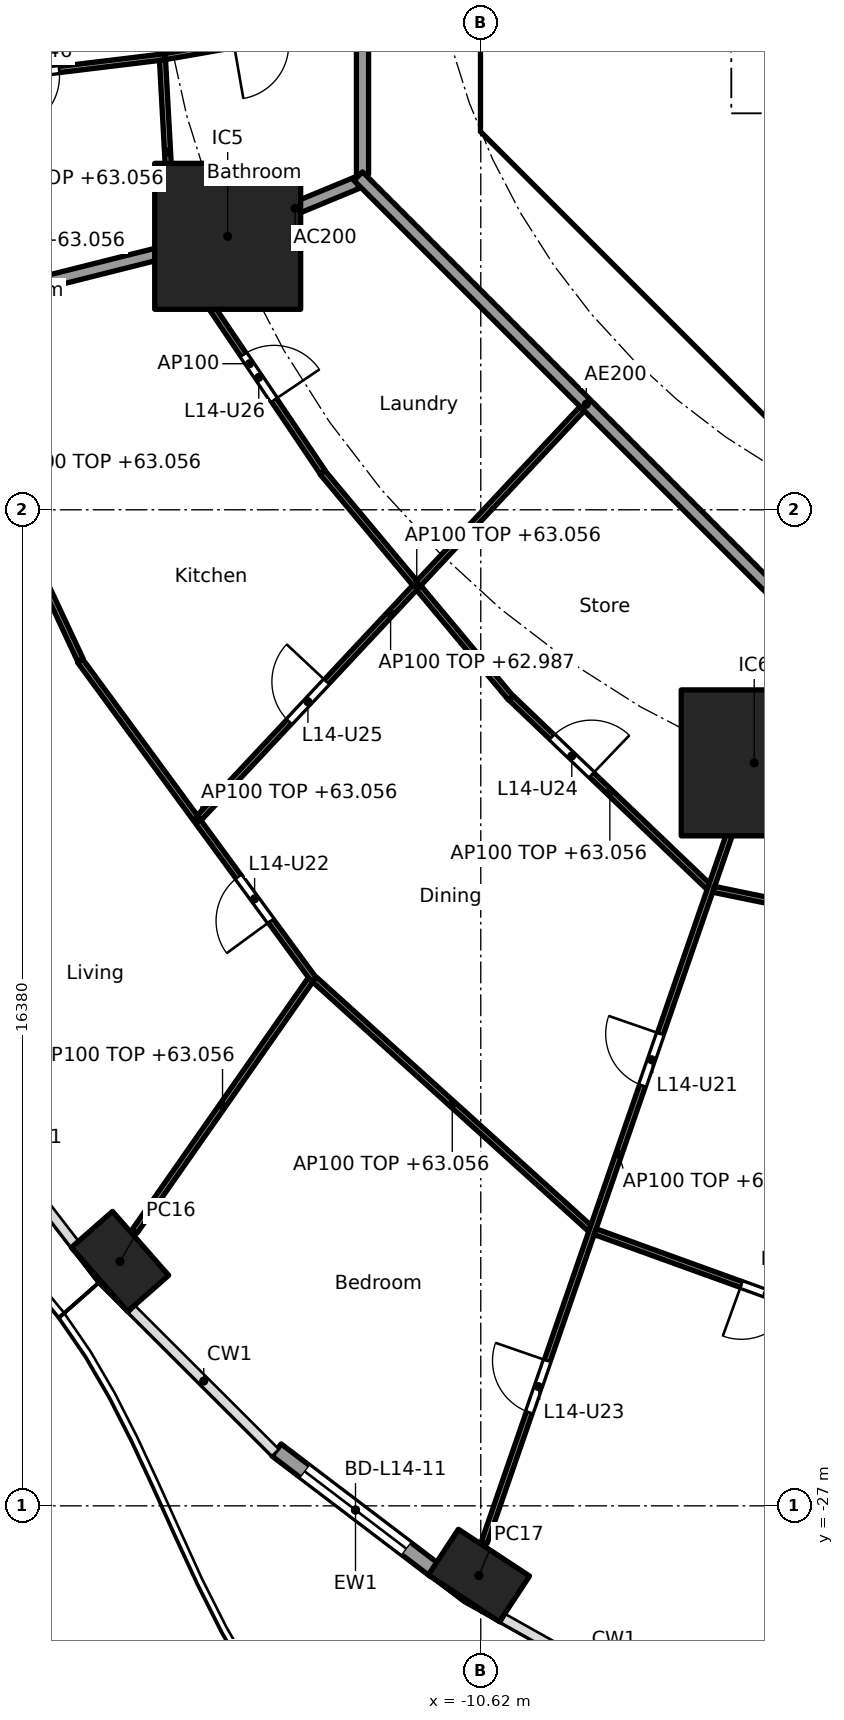
"""IFC4 building model, lengths in metres.
Left out: names, types, materials, properties, quantities, classifications, styles, units other than length and angle.
Written with IfcOpenShell. Run it as: python <this file> out.ifc"""

import sys

from ifc_helpers import new_model, si_unit, direction, frame, frame_2d, origin, origin_2d, place, context, subcontext, project, spatial, polyline, rectangle, hollow_rectangle, outline, extrude, element, fill, save


model = new_model("IFC4")
c1 = context("Model", 3, precision=1e-05, world=origin(), true_north=direction((0.0, 1.0)))
c2 = subcontext(c1, "Body", "Model", "MODEL_VIEW")
j1 = project(units=[si_unit("LENGTHUNIT", "METRE"), si_unit("PLANEANGLEUNIT", "RADIAN")], contexts=[c1])
p1 = place(None, origin())
s1 = spatial("IfcSite", under=j1, at=p1, CompositionType="ELEMENT")
p2 = place(p1, origin())
s2 = spatial("IfcBuilding", under=s1, at=p2, CompositionType="ELEMENT")
p3 = place(p2, frame((0.0, 0.0, 60.3)))
s3 = spatial("IfcBuildingStorey", under=s2, at=p3, CompositionType="ELEMENT", Elevation=60.3)
for number, where, z_axis, x_axis in (
    (1, (-16.552, -22.981, 0.0), (0.0, 0.0, 1.0), (0.66, -0.751, 0.0)),
    (2, (-10.65, -28.146, 0.0), (0.0, 0.0, 1.0), (0.836, -0.549, 0.0)),
):
    element("IfcColumn", number, at=place(p3, frame(where, z_axis=z_axis, x_axis=x_axis)), inside=s3, PredefinedType="COLUMN", context=c2, shape_type="SweptSolid", body=[
        extrude(hollow_rectangle(XDim=1.4, YDim=0.9, WallThickness=0.05, at=origin_2d()), origin(), (0.0, 0.0, 1.0), 3.7),
    ])
for number, where, z_axis, x_axis in (
    (3, (-14.782, -6.123, 0.0), (0.0, 0.0, 1.0), (1.0, 0.0, 0.0)),
    (4, (-6.123, -14.782, 0.0), (0.0, 0.0, 1.0), (1.0, 0.0, 0.0)),
):
    element("IfcColumn", number, at=place(p3, frame(where, z_axis=z_axis, x_axis=x_axis)), inside=s3, PredefinedType="COLUMN", context=c2, shape_type="SweptSolid", body=[
        extrude(rectangle(XDim=2.4, YDim=2.4, at=origin_2d()), origin(), (0.0, 0.0, 1.0), 3.7),
    ])
p4 = place(p3, frame((-11.382, -28.056, 0.0), z_axis=(0.0, 0.0, 1.0), x_axis=(-0.796022293214, 0.605267303517, 0.0)))
e5 = element("IfcWall", 5, at=p4, inside=s3, PredefinedType="SOLIDWALL", context=c2, shape_type="SweptSolid", body=[
    extrude(rectangle(XDim=3.262, YDim=0.25, at=frame_2d((1.631, 0.0))), origin(), (0.0, 0.0, 1.0), 3.44),
])
p5 = place(p4, frame((0.581, 0.0, 0.0)))
e6 = element("IfcOpeningElement", 6, at=p5, cuts=e5, PredefinedType="OPENING", context=c2, shape_type="SweptSolid", body=[
    extrude(rectangle(XDim=2.1, YDim=2.4, at=frame_2d((1.05, 1.2))), frame((0.0, 0.135, 0.0), z_axis=(0.0, -1.0, 0.0), x_axis=(1.0, 0.0, 0.0)), (0.0, 0.0, 1.0), 0.27),
])
p6 = place(p3, frame((-10.325, 3.801, 0.0), z_axis=(0.0, 0.0, 1.0), x_axis=(0.0, -1.0, 0.0)))
e7 = element("IfcWall", 7, at=p6, inside=s3, PredefinedType="SHEAR", context=c2, shape_type="SweptSolid", body=[
    extrude(rectangle(XDim=7.602, YDim=0.6, at=frame_2d((3.801, 0.0))), origin(), (0.0, 0.0, 1.0), 3.44),
])
p7 = place(p6, frame((0.651, 0.0, 0.0)))
e8 = element("IfcOpeningElement", 8, at=p7, cuts=e7, PredefinedType="OPENING", context=c2, shape_type="SweptSolid", body=[
    extrude(rectangle(XDim=1.5, YDim=2.1, at=frame_2d((0.75, 1.05))), frame((0.0, 0.31, 0.0), z_axis=(0.0, -1.0, 0.0), x_axis=(1.0, 0.0, 0.0)), (0.0, 0.0, 1.0), 0.62),
])
p8 = place(p6, frame((5.451, 0.0, 0.0)))
e9 = element("IfcOpeningElement", 9, at=p8, cuts=e7, PredefinedType="OPENING", context=c2, shape_type="SweptSolid", body=[
    extrude(rectangle(XDim=1.5, YDim=2.1, at=frame_2d((0.75, 1.05))), frame((0.0, 0.31, 0.0), z_axis=(0.0, -1.0, 0.0), x_axis=(1.0, 0.0, 0.0)), (0.0, 0.0, 1.0), 0.62),
])
p9 = place(p3, frame((-9.988, -4.613, 0.0), z_axis=(0.0, 0.0, 1.0), x_axis=(0.707106781187, -0.707106781187, 0.0)))
e10 = element("IfcWall", 10, at=p9, inside=s3, PredefinedType="SHEAR", context=c2, shape_type="SweptSolid", body=[
    extrude(rectangle(XDim=7.602, YDim=0.6, at=frame_2d((3.801, 0.0))), origin(), (0.0, 0.0, 1.0), 3.44),
])
p10 = place(p9, frame((6.151, 0.0, 0.0)))
e11 = element("IfcOpeningElement", 11, at=p10, cuts=e10, PredefinedType="OPENING", context=c2, shape_type="SweptSolid", body=[
    extrude(rectangle(XDim=1.1, YDim=2.1, at=frame_2d((0.55, 1.05))), frame((0.0, 0.31, 0.0), z_axis=(0.0, -1.0, 0.0), x_axis=(1.0, 0.0, 0.0)), (0.0, 0.0, 1.0), 0.62),
])
p11 = place(p3, frame((-7.4, -6.627, 0.0), z_axis=(0.0, 0.0, 1.0), x_axis=(0.0, 1.0, 0.0)))
e12 = element("IfcWall", 12, at=p11, inside=s3, PredefinedType="PARTITIONING", context=c2, shape_type="SweptSolid", body=[
    extrude(rectangle(XDim=2.527, YDim=0.15, at=frame_2d((1.263, 0.0))), origin(), (0.0, 0.0, 1.0), 3.44),
])
p12 = place(p11, frame((0.776, 0.0, 0.0)))
e13 = element("IfcOpeningElement", 13, at=p12, cuts=e12, PredefinedType="OPENING", context=c2, shape_type="SweptSolid", body=[
    extrude(rectangle(XDim=0.9, YDim=2.1, at=frame_2d((0.45, 1.05))), frame((0.0, 0.085, 0.0), z_axis=(0.0, -1.0, 0.0), x_axis=(1.0, 0.0, 0.0)), (0.0, 0.0, 1.0), 0.17),
])
p13 = place(p3, origin())
e14 = element("IfcWall", 14, at=p13, inside=s3, PredefinedType="SHEAR", context=c2, shape_type="SweptSolid", body=[
    extrude(outline(polyline([(-10.625, -3.801), (-10.025, -3.801), (-10.025, -4.152), (-9.776, -4.401), (-10.2, -4.825), (-10.625, -4.401), (-10.625, -3.801)])), origin(), (0.0, 0.0, 1.0), 3.44),
])
p14 = place(p3, frame((-10.025, -4.0, 0.0), z_axis=(0.0, 0.0, 1.0), x_axis=(1.0, 0.0, 0.0)))
e15 = element("IfcWall", 15, at=p14, inside=s3, PredefinedType="PARTITIONING", context=c2, shape_type="SweptSolid", body=[
    extrude(rectangle(XDim=3.325, YDim=0.2, at=frame_2d((1.662, 0.0))), origin(), (0.0, 0.0, 1.0), 3.44),
])
p15 = place(p3, origin())
e16 = element("IfcWall", 16, at=p15, inside=s3, PredefinedType="SOLIDWALL", context=c2, shape_type="SweptSolid", body=[
    extrude(outline(polyline([(-6.7, -2.1), (-6.5, -2.1), (-6.5, -4.1), (-4.5, -4.1), (-4.5, -2.1), (-4.3, -2.1), (-4.3, -4.1), (-2.3, -4.1), (-2.3, -2.1), (-2.1, -2.1), (-2.1, -4.1), (-0.1, -4.1), (-0.1, -2.1), (0.1, -2.1), (0.1, -4.1), (2.1, -4.1), (2.1, -2.1), (2.3, -2.1), (2.3, -4.1), (4.3, -4.1), (4.3, -2.1), (4.5, -2.1), (4.5, -4.1), (6.5, -4.1), (6.5, -2.1), (6.7, -2.1), (6.7, -4.3), (-6.7, -4.3), (-6.7, -2.1)])), origin(), (0.0, 0.0, 1.0), 3.44),
])
p16 = place(p3, frame((-12.657, -5.243, 0.0), z_axis=(0.0, 0.0, 1.0), x_axis=(-0.923885664896, -0.382668627144, 0.0)))
e17 = element("IfcWall", 17, at=p16, inside=s3, PredefinedType="PARTITIONING", context=c2, shape_type="SweptSolid", body=[
    extrude(rectangle(XDim=2.2, YDim=0.2, at=frame_2d((1.1, 0.0))), origin(), (0.0, 0.0, 1.0), 3.44),
])
p17 = place(p3, frame((-14.831, -6.135, 0.0), z_axis=(0.0, 0.0, 1.0), x_axis=(-0.969884949569, -0.243563512454, 0.0)))
e18 = element("IfcWall", 18, at=p17, inside=s3, PredefinedType="PARTITIONING", context=c2, shape_type="SweptSolid", body=[
    extrude(rectangle(XDim=8.829, YDim=0.2, at=frame_2d((4.415, 0.0))), origin(), (0.0, 0.0, 1.0), 2.756),
])
p18 = place(p3, frame((-12.565, 5.304, 0.0), z_axis=(0.0, 0.0, 1.0), x_axis=(0.0, -1.0, 0.0)))
e19 = element("IfcWall", 19, at=p18, inside=s3, PredefinedType="PARTITIONING", context=c2, shape_type="SweptSolid", body=[
    extrude(rectangle(XDim=10.409, YDim=0.2, at=frame_2d((5.205, 0.0))), origin(), (0.0, 0.0, 1.0), 3.44),
])
p19 = place(p18, frame((6.106, 0.0, 0.0)))
e20 = element("IfcOpeningElement", 20, at=p19, cuts=e19, PredefinedType="OPENING", context=c2, shape_type="SweptSolid", body=[
    extrude(rectangle(XDim=1.0, YDim=2.1, at=frame_2d((0.5, 1.05))), frame((0.0, 0.11, 0.0), z_axis=(0.0, -1.0, 0.0), x_axis=(1.0, 0.0, 0.0)), (0.0, 0.0, 1.0), 0.22),
])
p20 = place(p3, frame((-12.635, -5.134, 0.0), z_axis=(0.0, 0.0, 1.0), x_axis=(0.707106781187, -0.707106781187, 0.0)))
e21 = element("IfcWall", 21, at=p20, inside=s3, PredefinedType="PARTITIONING", context=c2, shape_type="SweptSolid", body=[
    extrude(rectangle(XDim=10.609, YDim=0.2, at=frame_2d((5.305, 0.0))), origin(), (0.0, 0.0, 1.0), 3.44),
])
p21 = place(p3, frame((-12.663, -2.619, 0.0), z_axis=(0.0, 0.0, 1.0), x_axis=(-0.985220176102, -0.171292745325, 0.0)))
e22 = element("IfcWall", 22, at=p21, inside=s3, PredefinedType="PARTITIONING", context=c2, shape_type="SweptSolid", body=[
    extrude(rectangle(XDim=3.191, YDim=0.1, at=frame_2d((1.596, 0.0))), origin(), (0.0, 0.0, 1.0), 2.687),
])
p22 = place(p21, frame((1.146, 0.0, 0.0)))
e23 = element("IfcOpeningElement", 23, at=p22, cuts=e22, PredefinedType="OPENING", context=c2, shape_type="SweptSolid", body=[
    extrude(rectangle(XDim=0.9, YDim=2.1, at=frame_2d((0.45, 1.05))), frame((0.0, 0.06, 0.0), z_axis=(0.0, -1.0, 0.0), x_axis=(1.0, 0.0, 0.0)), (0.0, 0.0, 1.0), 0.12),
])
p23 = place(p3, frame((-15.807, -3.168, 0.0), z_axis=(0.0, 0.0, 1.0), x_axis=(-0.992741666002, -0.120266306938, 0.0)))
e24 = element("IfcWall", 24, at=p23, inside=s3, PredefinedType="PARTITIONING", context=c2, shape_type="SweptSolid", body=[
    extrude(rectangle(XDim=4.371, YDim=0.1, at=frame_2d((2.185, 0.0))), origin(), (0.0, 0.0, 1.0), 3.44),
])
p24 = place(p23, frame((1.76, 0.0, 0.0)))
e25 = element("IfcOpeningElement", 25, at=p24, cuts=e24, PredefinedType="OPENING", context=c2, shape_type="SweptSolid", body=[
    extrude(rectangle(XDim=0.9, YDim=2.1, at=frame_2d((0.45, 1.05))), frame((0.0, 0.06, 0.0), z_axis=(0.0, -1.0, 0.0), x_axis=(1.0, 0.0, 0.0)), (0.0, 0.0, 1.0), 0.12),
])
p25 = place(p3, frame((-15.854, -3.225, 0.0), z_axis=(0.0, 0.0, 1.0), x_axis=(0.054644199943, -0.998505889523, 0.0)))
e26 = element("IfcWall", 26, at=p25, inside=s3, PredefinedType="PARTITIONING", context=c2, shape_type="SweptSolid", body=[
    extrude(rectangle(XDim=3.029, YDim=0.1, at=frame_2d((1.515, 0.0))), origin(), (0.0, 0.0, 1.0), 2.756),
])
p26 = place(p3, frame((-15.627, -6.432, 0.0), z_axis=(0.0, 0.0, 1.0), x_axis=(0.559112679527, -0.829091678641, 0.0)))
e27 = element("IfcWall", 27, at=p26, inside=s3, PredefinedType="PARTITIONING", context=c2, shape_type="SweptSolid", body=[
    extrude(rectangle(XDim=4.308, YDim=0.1, at=frame_2d((2.154, 0.0))), origin(), (0.0, 0.0, 1.0), 3.44),
])
p27 = place(p26, frame((1.975, 0.0, 0.0)))
e28 = element("IfcOpeningElement", 28, at=p27, cuts=e27, PredefinedType="OPENING", context=c2, shape_type="SweptSolid", body=[
    extrude(rectangle(XDim=0.9, YDim=2.1, at=frame_2d((0.45, 1.05))), frame((0.0, 0.06, 0.0), z_axis=(0.0, -1.0, 0.0), x_axis=(1.0, 0.0, 0.0)), (0.0, 0.0, 1.0), 0.12),
])
p28 = place(p3, frame((-19.826, -7.491, 0.0), z_axis=(0.0, 0.0, 1.0), x_axis=(0.423926333401, -0.905696673202, 0.0)))
e29 = element("IfcWall", 29, at=p28, inside=s3, PredefinedType="PARTITIONING", context=c2, shape_type="SweptSolid", body=[
    extrude(rectangle(XDim=6.188, YDim=0.1, at=frame_2d((3.094, 0.0))), origin(), (0.0, 0.0, 1.0), 2.756),
])
p29 = place(p3, frame((-13.222, -10.007, 0.0), z_axis=(0.0, 0.0, 1.0), x_axis=(0.64083455704, -0.767679015282, 0.0)))
e30 = element("IfcWall", 30, at=p29, inside=s3, PredefinedType="PARTITIONING", context=c2, shape_type="SweptSolid", body=[
    extrude(rectangle(XDim=4.837, YDim=0.1, at=frame_2d((2.418, 0.0))), origin(), (0.0, 0.0, 1.0), 2.756),
])
p30 = place(p3, frame((-17.211, -13.1, 0.0), z_axis=(0.0, 0.0, 1.0), x_axis=(0.591191311491, -0.806531359104, 0.0)))
e31 = element("IfcWall", 31, at=p30, inside=s3, PredefinedType="PARTITIONING", context=c2, shape_type="SweptSolid", body=[
    extrude(rectangle(XDim=6.51, YDim=0.1, at=frame_2d((3.255, 0.0))), origin(), (0.0, 0.0, 1.0), 2.756),
])
p31 = place(p30, frame((4.407, 0.0, 0.0)))
e32 = element("IfcOpeningElement", 32, at=p31, cuts=e31, PredefinedType="OPENING", context=c2, shape_type="SweptSolid", body=[
    extrude(rectangle(XDim=0.9, YDim=2.1, at=frame_2d((0.45, 1.05))), frame((0.0, 0.06, 0.0), z_axis=(0.0, -1.0, 0.0), x_axis=(1.0, 0.0, 0.0)), (0.0, 0.0, 1.0), 0.12),
])
p32 = place(p3, frame((-8.953, -8.958, 0.0), z_axis=(0.0, 0.0, 1.0), x_axis=(-0.683322485948, -0.730116689439, 0.0)))
e33 = element("IfcWall", 33, at=p32, inside=s3, PredefinedType="PARTITIONING", context=c2, shape_type="SweptSolid", body=[
    extrude(rectangle(XDim=9.219, YDim=0.1, at=frame_2d((4.609, 0.0))), origin(), (0.0, 0.0, 1.0), 2.687),
])
p33 = place(p32, frame((6.149, 0.0, 0.0)))
e34 = element("IfcOpeningElement", 34, at=p33, cuts=e33, PredefinedType="OPENING", context=c2, shape_type="SweptSolid", body=[
    extrude(rectangle(XDim=0.9, YDim=2.1, at=frame_2d((0.45, 1.05))), frame((0.0, 0.06, 0.0), z_axis=(0.0, -1.0, 0.0), x_axis=(1.0, 0.0, 0.0)), (0.0, 0.0, 1.0), 0.12),
])
p34 = place(p3, frame((-10.119, -13.716, 0.0), z_axis=(0.0, 0.0, 1.0), x_axis=(0.722762371977, -0.691096631199, 0.0)))
e35 = element("IfcWall", 35, at=p34, inside=s3, PredefinedType="PARTITIONING", context=c2, shape_type="SweptSolid", body=[
    extrude(rectangle(XDim=4.487, YDim=0.1, at=frame_2d((2.244, 0.0))), origin(), (0.0, 0.0, 1.0), 2.756),
])
p35 = place(p34, frame((0.927, 0.0, 0.0)))
e36 = element("IfcOpeningElement", 36, at=p35, cuts=e35, PredefinedType="OPENING", context=c2, shape_type="SweptSolid", body=[
    extrude(rectangle(XDim=0.9, YDim=2.1, at=frame_2d((0.45, 1.05))), frame((0.0, 0.06, 0.0), z_axis=(0.0, -1.0, 0.0), x_axis=(1.0, 0.0, 0.0)), (0.0, 0.0, 1.0), 0.12),
])
p36 = place(p3, frame((-13.42, -18.351, 0.0), z_axis=(0.0, 0.0, 1.0), x_axis=(-0.573127875153, -0.819465947262, 0.0)))
e37 = element("IfcWall", 37, at=p36, inside=s3, PredefinedType="PARTITIONING", context=c2, shape_type="SweptSolid", body=[
    extrude(rectangle(XDim=5.047, YDim=0.1, at=frame_2d((2.523, 0.0))), origin(), (0.0, 0.0, 1.0), 2.756),
])
p37 = place(p3, frame((-13.355, -18.343, 0.0), z_axis=(0.0, 0.0, 1.0), x_axis=(0.741722263338, -0.670707152242, 0.0)))
e38 = element("IfcWall", 38, at=p37, inside=s3, PredefinedType="PARTITIONING", context=c2, shape_type="SweptSolid", body=[
    extrude(rectangle(XDim=6.109, YDim=0.1, at=frame_2d((3.055, 0.0))), origin(), (0.0, 0.0, 1.0), 2.756),
])
p38 = place(p3, frame((-5.243, -12.657, 0.0), z_axis=(0.0, 0.0, 1.0), x_axis=(-0.382719158442, -0.923864733477, 0.0)))
e39 = element("IfcWall", 39, at=p38, inside=s3, PredefinedType="PARTITIONING", context=c2, shape_type="SweptSolid", body=[
    extrude(rectangle(XDim=2.25, YDim=0.1, at=frame_2d((1.125, 0.0))), origin(), (0.0, 0.0, 1.0), 3.44),
])
p39 = place(p3, frame((-6.139, -14.829, 0.0), z_axis=(0.0, 0.0, 1.0), x_axis=(-0.327178799566, -0.944962450637, 0.0)))
e40 = element("IfcWall", 40, at=p39, inside=s3, PredefinedType="PARTITIONING", context=c2, shape_type="SweptSolid", body=[
    extrude(rectangle(XDim=13.517, YDim=0.1, at=frame_2d((6.759, 0.0))), origin(), (0.0, 0.0, 1.0), 2.756),
])
p40 = place(p39, frame((4.665, 0.0, 0.0)))
e41 = element("IfcOpeningElement", 41, at=p40, cuts=e40, PredefinedType="OPENING", context=c2, shape_type="SweptSolid", body=[
    extrude(rectangle(XDim=0.9, YDim=2.1, at=frame_2d((0.45, 1.05))), frame((0.0, 0.06, 0.0), z_axis=(0.0, -1.0, 0.0), x_axis=(1.0, 0.0, 0.0)), (0.0, 0.0, 1.0), 0.12),
])
p41 = place(p39, frame((10.354, 0.0, 0.0)))
e42 = element("IfcOpeningElement", 42, at=p41, cuts=e40, PredefinedType="OPENING", context=c2, shape_type="SweptSolid", body=[
    extrude(rectangle(XDim=0.9, YDim=2.1, at=frame_2d((0.45, 1.05))), frame((0.0, 0.06, 0.0), z_axis=(0.0, -1.0, 0.0), x_axis=(1.0, 0.0, 0.0)), (0.0, 0.0, 1.0), 0.12),
])
p42 = place(p3, frame((-6.791, -16.862, 0.0), z_axis=(0.0, 0.0, 1.0), x_axis=(0.979587203416, -0.2010196779, 0.0)))
e43 = element("IfcWall", 43, at=p42, inside=s3, PredefinedType="PARTITIONING", context=c2, shape_type="SweptSolid", body=[
    extrude(rectangle(XDim=4.613, YDim=0.1, at=frame_2d((2.306, 0.0))), origin(), (0.0, 0.0, 1.0), 2.756),
])
p43 = place(p3, frame((-8.739, -22.491, 0.0), z_axis=(0.0, 0.0, 1.0), x_axis=(0.940401691072, -0.340065669288, 0.0)))
e44 = element("IfcWall", 44, at=p43, inside=s3, PredefinedType="PARTITIONING", context=c2, shape_type="SweptSolid", body=[
    extrude(rectangle(XDim=6.067, YDim=0.1, at=frame_2d((3.034, 0.0))), origin(), (0.0, 0.0, 1.0), 2.756),
])
p44 = place(p43, frame((2.559, 0.0, 0.0)))
e45 = element("IfcOpeningElement", 45, at=p44, cuts=e44, PredefinedType="OPENING", context=c2, shape_type="SweptSolid", body=[
    extrude(rectangle(XDim=0.9, YDim=2.1, at=frame_2d((0.45, 1.05))), frame((0.0, 0.06, 0.0), z_axis=(0.0, -1.0, 0.0), x_axis=(1.0, 0.0, 0.0)), (0.0, 0.0, 1.0), 0.12),
])
p45 = place(p5, origin())
e46 = element("IfcDoor", 46, at=p45, inside=s3, OperationType="SLIDING_TO_LEFT", PredefinedType="DOOR", context=c2, shape_type="SweptSolid", body=[
    extrude(rectangle(XDim=2.1, YDim=2.4, at=frame_2d((1.05, 1.2))), frame((0.0, 0.025, 0.0), z_axis=(0.0, -1.0, 0.0), x_axis=(1.0, 0.0, 0.0)), (0.0, 0.0, 1.0), 0.05),
])
fill(e6, e46)
p46 = place(p12, origin())
e47 = element("IfcDoor", 47, at=p46, inside=s3, OperationType="SINGLE_SWING_RIGHT", PredefinedType="DOOR", context=c2, shape_type="SweptSolid", body=[
    extrude(rectangle(XDim=0.9, YDim=2.1, at=frame_2d((0.45, 1.05))), frame((0.0, 0.025, 0.0), z_axis=(0.0, -1.0, 0.0), x_axis=(1.0, 0.0, 0.0)), (0.0, 0.0, 1.0), 0.05),
])
fill(e13, e47)
p47 = place(p8, origin())
e48 = element("IfcDoor", 48, at=p47, inside=s3, OperationType="DOUBLE_DOOR_SINGLE_SWING", PredefinedType="DOOR", context=c2, shape_type="SweptSolid", body=[
    extrude(rectangle(XDim=1.5, YDim=2.1, at=frame_2d((0.75, 1.05))), frame((0.0, 0.025, 0.0), z_axis=(0.0, -1.0, 0.0), x_axis=(1.0, 0.0, 0.0)), (0.0, 0.0, 1.0), 0.05),
])
fill(e9, e48)
p48 = place(p44, frame((0.9, 0.0, 0.0), x_axis=(-1.0, 0.0, 0.0)))
e49 = element("IfcDoor", 49, at=p48, inside=s3, OperationType="SINGLE_SWING_RIGHT", PredefinedType="DOOR", context=c2, shape_type="SweptSolid", body=[
    extrude(rectangle(XDim=0.9, YDim=2.1, at=frame_2d((0.45, 1.05))), frame((0.0, 0.025, 0.0), z_axis=(0.0, -1.0, 0.0), x_axis=(1.0, 0.0, 0.0)), (0.0, 0.0, 1.0), 0.05),
])
fill(e45, e49)
p49 = place(p40, frame((0.9, 0.0, 0.0), x_axis=(-1.0, 0.0, 0.0)))
e50 = element("IfcDoor", 50, at=p49, inside=s3, OperationType="SINGLE_SWING_RIGHT", PredefinedType="DOOR", context=c2, shape_type="SweptSolid", body=[
    extrude(rectangle(XDim=0.9, YDim=2.1, at=frame_2d((0.45, 1.05))), frame((0.0, 0.025, 0.0), z_axis=(0.0, -1.0, 0.0), x_axis=(1.0, 0.0, 0.0)), (0.0, 0.0, 1.0), 0.05),
])
fill(e41, e50)
p50 = place(p31, frame((0.9, 0.0, 0.0), x_axis=(-1.0, 0.0, 0.0)))
e51 = element("IfcDoor", 51, at=p50, inside=s3, OperationType="SINGLE_SWING_LEFT", PredefinedType="DOOR", context=c2, shape_type="SweptSolid", body=[
    extrude(rectangle(XDim=0.9, YDim=2.1, at=frame_2d((0.45, 1.05))), frame((0.0, 0.025, 0.0), z_axis=(0.0, -1.0, 0.0), x_axis=(1.0, 0.0, 0.0)), (0.0, 0.0, 1.0), 0.05),
])
fill(e32, e51)
p51 = place(p41, frame((0.9, 0.0, 0.0), x_axis=(-1.0, 0.0, 0.0)))
e52 = element("IfcDoor", 52, at=p51, inside=s3, OperationType="SINGLE_SWING_RIGHT", PredefinedType="DOOR", context=c2, shape_type="SweptSolid", body=[
    extrude(rectangle(XDim=0.9, YDim=2.1, at=frame_2d((0.45, 1.05))), frame((0.0, 0.025, 0.0), z_axis=(0.0, -1.0, 0.0), x_axis=(1.0, 0.0, 0.0)), (0.0, 0.0, 1.0), 0.05),
])
fill(e42, e52)
p52 = place(p35, origin())
e53 = element("IfcDoor", 53, at=p52, inside=s3, OperationType="SINGLE_SWING_RIGHT", PredefinedType="DOOR", context=c2, shape_type="SweptSolid", body=[
    extrude(rectangle(XDim=0.9, YDim=2.1, at=frame_2d((0.45, 1.05))), frame((0.0, 0.025, 0.0), z_axis=(0.0, -1.0, 0.0), x_axis=(1.0, 0.0, 0.0)), (0.0, 0.0, 1.0), 0.05),
])
fill(e36, e53)
p53 = place(p33, frame((0.9, 0.0, 0.0), x_axis=(-1.0, 0.0, 0.0)))
e54 = element("IfcDoor", 54, at=p53, inside=s3, OperationType="SINGLE_SWING_RIGHT", PredefinedType="DOOR", context=c2, shape_type="SweptSolid", body=[
    extrude(rectangle(XDim=0.9, YDim=2.1, at=frame_2d((0.45, 1.05))), frame((0.0, 0.025, 0.0), z_axis=(0.0, -1.0, 0.0), x_axis=(1.0, 0.0, 0.0)), (0.0, 0.0, 1.0), 0.05),
])
fill(e34, e54)
p54 = place(p27, origin())
e55 = element("IfcDoor", 55, at=p54, inside=s3, OperationType="SINGLE_SWING_RIGHT", PredefinedType="DOOR", context=c2, shape_type="SweptSolid", body=[
    extrude(rectangle(XDim=0.9, YDim=2.1, at=frame_2d((0.45, 1.05))), frame((0.0, 0.025, 0.0), z_axis=(0.0, -1.0, 0.0), x_axis=(1.0, 0.0, 0.0)), (0.0, 0.0, 1.0), 0.05),
])
fill(e28, e55)
p55 = place(p24, origin())
e56 = element("IfcDoor", 56, at=p55, inside=s3, OperationType="SINGLE_SWING_RIGHT", PredefinedType="DOOR", context=c2, shape_type="SweptSolid", body=[
    extrude(rectangle(XDim=0.9, YDim=2.1, at=frame_2d((0.45, 1.05))), frame((0.0, 0.025, 0.0), z_axis=(0.0, -1.0, 0.0), x_axis=(1.0, 0.0, 0.0)), (0.0, 0.0, 1.0), 0.05),
])
fill(e25, e56)
save(model, sys.argv[1])
